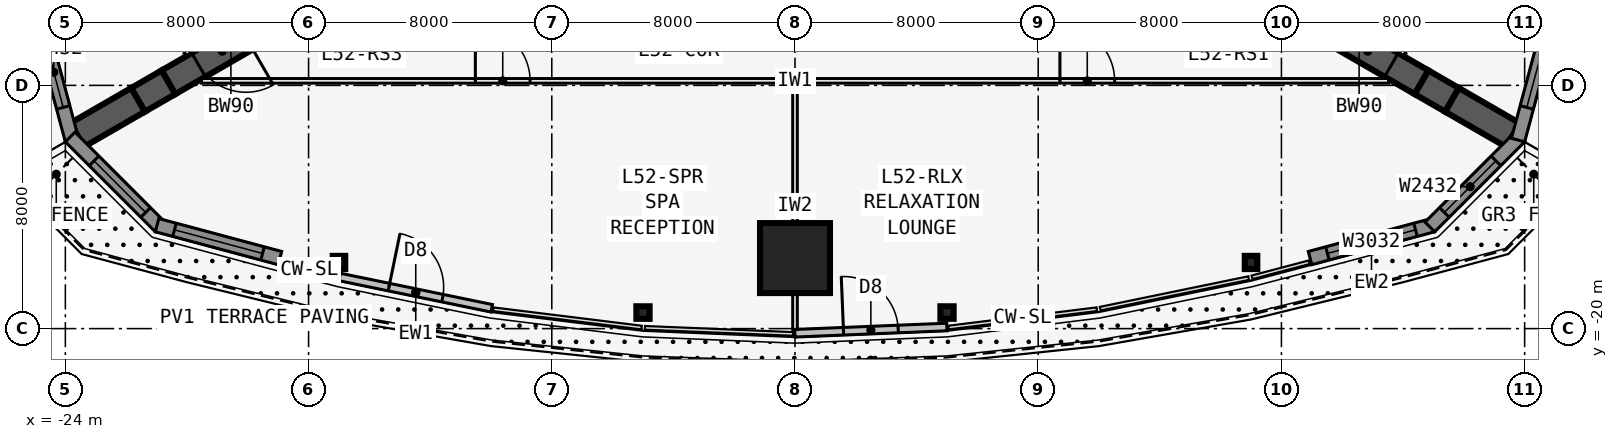
"""IFC4 building model, lengths in metres.
Left out: names, types, materials, properties, quantities, classifications, styles, units other than length and angle.
Written with IfcOpenShell. Run it as: python <this file> out.ifc"""

import sys

from ifc_helpers import new_model, si_unit, direction, frame, frame_2d, origin, origin_2d, place, context, subcontext, project, spatial, polyline, rectangle, i_section, outline, extrude, element, fill, save


model = new_model("IFC4")
c1 = context("Model", 3, precision=1e-05, world=origin(), true_north=direction((0.0, 1.0)))
c2 = subcontext(c1, "Body", "Model", "MODEL_VIEW")
j1 = project(units=[si_unit("LENGTHUNIT", "METRE"), si_unit("PLANEANGLEUNIT", "RADIAN")], contexts=[c1])
p1 = place(None, origin())
s1 = spatial("IfcSite", under=j1, at=p1, CompositionType="ELEMENT")
p2 = place(p1, origin())
s2 = spatial("IfcBuilding", under=s1, at=p2, CompositionType="ELEMENT")
p3 = place(p2, frame((0.0, 0.0, 195.9)))
s3 = spatial("IfcBuildingStorey", under=s2, at=p3, CompositionType="ELEMENT", Elevation=195.9)
p4 = place(p3, frame((16.5, -9.526, 0.0), z_axis=(0.0, 0.0, 1.0), x_axis=(0.866031398331, -0.499989616998, 0.0)))
e1 = element("IfcWall", 1, at=p4, inside=s3, PredefinedType="SHEAR", context=c2, shape_type="SweptSolid", body=[
    extrude(rectangle(XDim=4.746, YDim=0.9, at=frame_2d((2.373, 0.0))), origin(), (0.0, 0.0, 1.0), 5.0),
])
p5 = place(p4, frame((1.8, 0.0, 0.0)))
e2 = element("IfcOpeningElement", 2, at=p5, cuts=e1, PredefinedType="OPENING", context=c2, shape_type="SweptSolid", body=[
    extrude(rectangle(XDim=1.8, YDim=2.13, at=frame_2d((0.9, 1.065))), frame((0.0, 0.46, 0.0), z_axis=(0.0, -1.0, 0.0), x_axis=(1.0, 0.0, 0.0)), (0.0, 0.0, 1.0), 0.92),
])
p6 = place(p3, frame((20.61, -11.899, 0.0), z_axis=(0.0, 0.0, 1.0), x_axis=(0.866009537788, -0.500027479704, 0.0)))
e3 = element("IfcWall", 3, at=p6, inside=s3, PredefinedType="SHEAR", context=c2, shape_type="SweptSolid", body=[
    extrude(rectangle(XDim=1.155, YDim=0.9, at=frame_2d((0.577, 0.0))), origin(), (0.0, 0.0, 1.0), 5.0),
])
p7 = place(p3, frame((21.61, -12.477, 0.0), z_axis=(0.0, 0.0, 1.0), x_axis=(0.866055313784, -0.499948190782, 0.0)))
e4 = element("IfcWall", 4, at=p7, inside=s3, PredefinedType="SHEAR", context=c2, shape_type="SweptSolid", body=[
    extrude(rectangle(XDim=2.309, YDim=0.9, at=frame_2d((1.155, 0.0))), origin(), (0.0, 0.0, 1.0), 5.0),
])
p8 = place(p3, frame((-16.5, -9.526, 0.0), z_axis=(0.0, 0.0, 1.0), x_axis=(-0.866031398331, -0.499989616998, 0.0)))
e5 = element("IfcWall", 5, at=p8, inside=s3, PredefinedType="SHEAR", context=c2, shape_type="SweptSolid", body=[
    extrude(rectangle(XDim=4.746, YDim=0.9, at=frame_2d((2.373, 0.0))), origin(), (0.0, 0.0, 1.0), 5.0),
])
p9 = place(p8, frame((1.8, 0.0, 0.0)))
e6 = element("IfcOpeningElement", 6, at=p9, cuts=e5, PredefinedType="OPENING", context=c2, shape_type="SweptSolid", body=[
    extrude(rectangle(XDim=1.8, YDim=2.13, at=frame_2d((0.9, 1.065))), frame((0.0, 0.46, 0.0), z_axis=(0.0, -1.0, 0.0), x_axis=(1.0, 0.0, 0.0)), (0.0, 0.0, 1.0), 0.92),
])
p10 = place(p3, frame((-20.61, -11.899, 0.0), z_axis=(0.0, 0.0, 1.0), x_axis=(-0.866009537788, -0.500027479704, 0.0)))
e7 = element("IfcWall", 7, at=p10, inside=s3, PredefinedType="SHEAR", context=c2, shape_type="SweptSolid", body=[
    extrude(rectangle(XDim=1.155, YDim=0.9, at=frame_2d((0.577, 0.0))), origin(), (0.0, 0.0, 1.0), 5.0),
])
p11 = place(p3, frame((-21.61, -12.477, 0.0), z_axis=(0.0, 0.0, 1.0), x_axis=(-0.866055313784, -0.499948190782, 0.0)))
e8 = element("IfcWall", 8, at=p11, inside=s3, PredefinedType="SHEAR", context=c2, shape_type="SweptSolid", body=[
    extrude(rectangle(XDim=2.309, YDim=0.9, at=frame_2d((1.155, 0.0))), origin(), (0.0, 0.0, 1.0), 5.0),
])
for number, where, z_axis, x_axis in (
    (9, (-15.0, -17.825, 0.0), (0.0, 0.0, 1.0), (1.0, 0.0, 0.0)),
    (10, (-5.0, -19.472, 0.0), (0.0, 0.0, 1.0), (0.0, -1.0, 0.0)),
    (11, (5.0, -19.472, 0.0), (0.0, 0.0, 1.0), (0.0, -1.0, 0.0)),
    (12, (15.0, -17.825, 0.0), (0.0, 0.0, 1.0), (1.0, 0.0, 0.0)),
):
    element("IfcColumn", number, at=place(p3, frame(where, z_axis=z_axis, x_axis=x_axis)), inside=s3, PredefinedType="COLUMN", context=c2, shape_type="SweptSolid", body=[
        extrude(i_section(OverallWidth=0.411, OverallDepth=0.434, WebThickness=0.036, FlangeThickness=0.057, at=origin_2d()), origin(), (0.0, 0.0, 1.0), 5.0),
    ])
p12 = place(p3, frame((0.0, -17.68, 0.0), z_axis=(0.0, 0.0, 1.0), x_axis=(0.0, -1.0, 0.0)))
e13 = element("IfcColumn", 13, at=p12, inside=s3, PredefinedType="COLUMN", context=c2, shape_type="SweptSolid", body=[
    extrude(rectangle(XDim=2.3, YDim=2.3, at=origin_2d()), origin(), (0.0, 0.0, 1.0), 5.0),
])
p13 = place(p3, frame((-14.975, -18.302, 0.0), z_axis=(0.0, 0.0, 1.0), x_axis=(0.979461488189, -0.201631329795, 0.0)))
e14 = element("IfcWall", 14, at=p13, inside=s3, PredefinedType="STANDARD", context=c2, shape_type="SweptSolid", body=[
    extrude(rectangle(XDim=5.105, YDim=0.25, at=frame_2d((2.552, 0.0))), origin(), (0.0, 0.0, 1.0), 4.835),
])
p14 = place(p13, frame((1.652, 0.0, 0.0)))
e15 = element("IfcOpeningElement", 15, at=p14, cuts=e14, PredefinedType="OPENING", context=c2, shape_type="SweptSolid", body=[
    extrude(rectangle(XDim=1.8, YDim=2.4, at=frame_2d((0.9, 1.2))), frame((0.0, 0.135, 0.0), z_axis=(0.0, -1.0, 0.0), x_axis=(1.0, 0.0, 0.0)), (0.0, 0.0, 1.0), 0.27),
])
p15 = place(p3, frame((-0.005, -20.153, 0.0), z_axis=(0.0, 0.0, 1.0), x_axis=(0.999151909423, 0.041175986892, 0.0)))
e16 = element("IfcWall", 16, at=p15, inside=s3, PredefinedType="STANDARD", context=c2, shape_type="SweptSolid", body=[
    extrude(rectangle(XDim=5.004, YDim=0.25, at=frame_2d((2.502, 0.0))), origin(), (0.0, 0.0, 1.0), 4.835),
])
p16 = place(p15, frame((1.602, 0.0, 0.0)))
e17 = element("IfcOpeningElement", 17, at=p16, cuts=e16, PredefinedType="OPENING", context=c2, shape_type="SweptSolid", body=[
    extrude(rectangle(XDim=1.8, YDim=2.4, at=frame_2d((0.9, 1.2))), frame((0.0, 0.135, 0.0), z_axis=(0.0, -1.0, 0.0), x_axis=(1.0, 0.0, 0.0)), (0.0, 0.0, 1.0), 0.27),
])
p17 = place(p3, frame((16.942, -17.681, 0.0), z_axis=(0.0, 0.0, 1.0), x_axis=(0.965920442324, 0.258839137498, 0.0)))
e18 = element("IfcWall", 18, at=p17, inside=s3, PredefinedType="SOLIDWALL", context=c2, shape_type="SweptSolid", body=[
    extrude(rectangle(XDim=4.184, YDim=0.45, at=frame_2d((2.092, 0.0))), origin(), (0.0, 0.0, 1.0), 4.835),
])
p18 = place(p17, frame((0.592, 0.0, 0.6)))
e19 = element("IfcOpeningElement", 19, at=p18, cuts=e18, PredefinedType="OPENING", context=c2, shape_type="SweptSolid", body=[
    extrude(rectangle(XDim=3.0, YDim=3.2, at=frame_2d((1.5, 1.6))), frame((0.0, 0.235, 0.0), z_axis=(0.0, -1.0, 0.0), x_axis=(1.0, 0.0, 0.0)), (0.0, 0.0, 1.0), 0.47),
])
p19 = place(p3, frame((20.882, -16.656, 0.0), z_axis=(0.0, 0.0, 1.0), x_axis=(0.707077605902, 0.707135955267, 0.0)))
e20 = element("IfcWall", 20, at=p19, inside=s3, PredefinedType="SOLIDWALL", context=c2, shape_type="SweptSolid", body=[
    extrude(outline(polyline([(4.184, 0.225), (4.125, 0.225), (3.633, 0.093), (3.598, 0.225), (0.0, 0.225), (0.0, -0.225), (4.184, -0.225), (4.184, 0.225)])), origin(), (0.0, 0.0, 1.0), 4.835),
])
p20 = place(p19, frame((0.674, 0.0, 0.6)))
e21 = element("IfcOpeningElement", 21, at=p20, cuts=e20, PredefinedType="OPENING", context=c2, shape_type="SweptSolid", body=[
    extrude(rectangle(XDim=2.4, YDim=3.2, at=frame_2d((1.2, 1.6))), frame((0.0, 0.235, 0.0), z_axis=(0.0, -1.0, 0.0), x_axis=(1.0, 0.0, 0.0)), (0.0, 0.0, 1.0), 0.47),
])
p21 = place(p3, frame((23.783, -13.798, 0.0), z_axis=(0.0, 0.0, 1.0), x_axis=(0.258799282522, 0.96593112144, 0.0)))
e22 = element("IfcWall", 22, at=p21, inside=s3, PredefinedType="SOLIDWALL", context=c2, shape_type="SweptSolid", body=[
    extrude(outline(polyline([(4.184, 0.225), (0.586, 0.225), (0.551, 0.093), (0.059, 0.225), (0.0, 0.225), (0.0, -0.225), (4.184, -0.225), (4.184, 0.225)])), origin(), (0.0, 0.0, 1.0), 4.835),
])
p22 = place(p21, frame((1.11, 0.0, 0.6)))
e23 = element("IfcOpeningElement", 23, at=p22, cuts=e22, PredefinedType="OPENING", context=c2, shape_type="SweptSolid", body=[
    extrude(rectangle(XDim=2.4, YDim=3.2, at=frame_2d((1.2, 1.6))), frame((0.0, 0.235, 0.0), z_axis=(0.0, -1.0, 0.0), x_axis=(1.0, 0.0, 0.0)), (0.0, 0.0, 1.0), 0.47),
])
p23 = place(p3, frame((-24.865, -9.757, 0.0), z_axis=(0.0, 0.0, 1.0), x_axis=(0.258799282522, -0.96593112144, 0.0)))
e24 = element("IfcWall", 24, at=p23, inside=s3, PredefinedType="SOLIDWALL", context=c2, shape_type="SweptSolid", body=[
    extrude(outline(polyline([(4.184, 0.225), (4.125, 0.225), (3.633, 0.093), (3.597, 0.225), (0.0, 0.225), (0.0, -0.225), (4.184, -0.225), (4.184, 0.225)])), origin(), (0.0, 0.0, 1.0), 4.835),
])
p24 = place(p23, frame((0.674, 0.0, 0.6)))
e25 = element("IfcOpeningElement", 25, at=p24, cuts=e24, PredefinedType="OPENING", context=c2, shape_type="SweptSolid", body=[
    extrude(rectangle(XDim=2.4, YDim=3.2, at=frame_2d((1.2, 1.6))), frame((0.0, 0.235, 0.0), z_axis=(0.0, -1.0, 0.0), x_axis=(1.0, 0.0, 0.0)), (0.0, 0.0, 1.0), 0.47),
])
p25 = place(p3, frame((-23.841, -13.697, 0.0), z_axis=(0.0, 0.0, 1.0), x_axis=(0.707077605902, -0.707135955267, 0.0)))
e26 = element("IfcWall", 26, at=p25, inside=s3, PredefinedType="SOLIDWALL", context=c2, shape_type="SweptSolid", body=[
    extrude(outline(polyline([(4.184, 0.225), (0.586, 0.225), (0.551, 0.093), (0.059, 0.225), (0.0, 0.225), (0.0, -0.225), (4.184, -0.225), (4.184, 0.225)])), origin(), (0.0, 0.0, 1.0), 4.835),
])
p26 = place(p25, frame((1.11, 0.0, 0.6)))
e27 = element("IfcOpeningElement", 27, at=p26, cuts=e26, PredefinedType="OPENING", context=c2, shape_type="SweptSolid", body=[
    extrude(rectangle(XDim=2.4, YDim=3.2, at=frame_2d((1.2, 1.6))), frame((0.0, 0.235, 0.0), z_axis=(0.0, -1.0, 0.0), x_axis=(1.0, 0.0, 0.0)), (0.0, 0.0, 1.0), 0.47),
])
p27 = place(p3, frame((-20.983, -16.598, 0.0), z_axis=(0.0, 0.0, 1.0), x_axis=(0.965920442324, -0.258839137498, 0.0)))
e28 = element("IfcWall", 28, at=p27, inside=s3, PredefinedType="SOLIDWALL", context=c2, shape_type="SweptSolid", body=[
    extrude(rectangle(XDim=4.184, YDim=0.45, at=frame_2d((2.092, 0.0))), origin(), (0.0, 0.0, 1.0), 4.835),
])
p28 = place(p27, frame((0.592, 0.0, 0.6)))
e29 = element("IfcOpeningElement", 29, at=p28, cuts=e28, PredefinedType="OPENING", context=c2, shape_type="SweptSolid", body=[
    extrude(rectangle(XDim=3.0, YDim=3.2, at=frame_2d((1.5, 1.6))), frame((0.0, 0.235, 0.0), z_axis=(0.0, -1.0, 0.0), x_axis=(1.0, 0.0, 0.0)), (0.0, 0.0, 1.0), 0.47),
])
p29 = place(p3, frame((-19.527, -11.851, 0.0), z_axis=(0.0, 0.0, 1.0), x_axis=(1.0, 0.0, 0.0)))
e30 = element("IfcWall", 30, at=p29, inside=s3, PredefinedType="PARTITIONING", context=c2, shape_type="SweptSolid", body=[
    extrude(rectangle(XDim=39.054, YDim=0.15, at=frame_2d((19.527, 0.0))), origin(), (0.0, 0.0, 1.0), 4.835),
])
p30 = place(p29, frame((9.013, 0.0, 0.0)))
e31 = element("IfcOpeningElement", 31, at=p30, cuts=e30, PredefinedType="OPENING", context=c2, shape_type="SweptSolid", body=[
    extrude(rectangle(XDim=1.8, YDim=2.13, at=frame_2d((0.9, 1.065))), frame((0.0, 0.085, 0.0), z_axis=(0.0, -1.0, 0.0), x_axis=(1.0, 0.0, 0.0)), (0.0, 0.0, 1.0), 0.17),
])
p31 = place(p29, frame((28.24, 0.0, 0.0)))
e32 = element("IfcOpeningElement", 32, at=p31, cuts=e30, PredefinedType="OPENING", context=c2, shape_type="SweptSolid", body=[
    extrude(rectangle(XDim=1.8, YDim=2.13, at=frame_2d((0.9, 1.065))), frame((0.0, 0.085, 0.0), z_axis=(0.0, -1.0, 0.0), x_axis=(1.0, 0.0, 0.0)), (0.0, 0.0, 1.0), 0.17),
])
p32 = place(p3, frame((0.0, -11.926, 0.0), z_axis=(0.0, 0.0, 1.0), x_axis=(0.0, -1.0, 0.0)))
e33 = element("IfcWall", 33, at=p32, inside=s3, PredefinedType="PARTITIONING", context=c2, shape_type="SweptSolid", body=[
    extrude(rectangle(XDim=8.101, YDim=0.15, at=frame_2d((4.051, 0.0))), origin(), (0.0, 0.0, 1.0), 3.989),
])
p33 = place(p3, frame((20.027, -10.985, 0.0), z_axis=(0.0, 0.0, 1.0), x_axis=(-0.500001677587, 0.866024435227, 0.0)))
e34 = element("IfcWall", 34, at=p33, inside=s3, PredefinedType="PARTITIONING", context=c2, shape_type="SweptSolid", body=[
    extrude(rectangle(XDim=39.054, YDim=0.15, at=frame_2d((19.527, 0.0))), origin(), (0.0, 0.0, 1.0), 4.835),
])
p34 = place(p33, frame((4.414, 0.0, 0.0)))
e35 = element("IfcOpeningElement", 35, at=p34, cuts=e34, PredefinedType="OPENING", context=c2, shape_type="SweptSolid", body=[
    extrude(rectangle(XDim=1.0, YDim=2.13, at=frame_2d((0.5, 1.065))), frame((0.0, 0.085, 0.0), z_axis=(0.0, -1.0, 0.0), x_axis=(1.0, 0.0, 0.0)), (0.0, 0.0, 1.0), 0.17),
])
p35 = place(p33, frame((14.027, 0.0, 0.0)))
e36 = element("IfcOpeningElement", 36, at=p35, cuts=e34, PredefinedType="OPENING", context=c2, shape_type="SweptSolid", body=[
    extrude(rectangle(XDim=1.0, YDim=2.13, at=frame_2d((0.5, 1.065))), frame((0.0, 0.085, 0.0), z_axis=(0.0, -1.0, 0.0), x_axis=(1.0, 0.0, 0.0)), (0.0, 0.0, 1.0), 0.17),
])
p36 = place(p33, frame((24.027, 0.0, 0.0)))
e37 = element("IfcOpeningElement", 37, at=p36, cuts=e34, PredefinedType="OPENING", context=c2, shape_type="SweptSolid", body=[
    extrude(rectangle(XDim=1.0, YDim=2.13, at=frame_2d((0.5, 1.065))), frame((0.0, 0.085, 0.0), z_axis=(0.0, -1.0, 0.0), x_axis=(1.0, 0.0, 0.0)), (0.0, 0.0, 1.0), 0.17),
])
p37 = place(p33, frame((33.64, 0.0, 0.0)))
e38 = element("IfcOpeningElement", 38, at=p37, cuts=e34, PredefinedType="OPENING", context=c2, shape_type="SweptSolid", body=[
    extrude(rectangle(XDim=1.0, YDim=2.13, at=frame_2d((0.5, 1.065))), frame((0.0, 0.085, 0.0), z_axis=(0.0, -1.0, 0.0), x_axis=(1.0, 0.0, 0.0)), (0.0, 0.0, 1.0), 0.17),
])
p38 = place(p3, frame((-0.5, 22.836, 0.0), z_axis=(0.0, 0.0, 1.0), x_axis=(-0.500001677587, -0.866024435227, 0.0)))
e39 = element("IfcWall", 39, at=p38, inside=s3, PredefinedType="PARTITIONING", context=c2, shape_type="SweptSolid", body=[
    extrude(rectangle(XDim=39.054, YDim=0.15, at=frame_2d((19.527, 0.0))), origin(), (0.0, 0.0, 1.0), 4.835),
])
p39 = place(p38, frame((4.414, 0.0, 0.0)))
e40 = element("IfcOpeningElement", 40, at=p39, cuts=e39, PredefinedType="OPENING", context=c2, shape_type="SweptSolid", body=[
    extrude(rectangle(XDim=1.0, YDim=2.13, at=frame_2d((0.5, 1.065))), frame((0.0, 0.085, 0.0), z_axis=(0.0, -1.0, 0.0), x_axis=(1.0, 0.0, 0.0)), (0.0, 0.0, 1.0), 0.17),
])
p40 = place(p38, frame((10.527, 0.0, 0.0)))
e41 = element("IfcOpeningElement", 41, at=p40, cuts=e39, PredefinedType="OPENING", context=c2, shape_type="SweptSolid", body=[
    extrude(rectangle(XDim=1.0, YDim=2.13, at=frame_2d((0.5, 1.065))), frame((0.0, 0.085, 0.0), z_axis=(0.0, -1.0, 0.0), x_axis=(1.0, 0.0, 0.0)), (0.0, 0.0, 1.0), 0.17),
])
p41 = place(p38, frame((15.527, 0.0, 0.0)))
e42 = element("IfcOpeningElement", 42, at=p41, cuts=e39, PredefinedType="OPENING", context=c2, shape_type="SweptSolid", body=[
    extrude(rectangle(XDim=1.0, YDim=2.13, at=frame_2d((0.5, 1.065))), frame((0.0, 0.085, 0.0), z_axis=(0.0, -1.0, 0.0), x_axis=(1.0, 0.0, 0.0)), (0.0, 0.0, 1.0), 0.17),
])
p42 = place(p38, frame((24.027, 0.0, 0.0)))
e43 = element("IfcOpeningElement", 43, at=p42, cuts=e39, PredefinedType="OPENING", context=c2, shape_type="SweptSolid", body=[
    extrude(rectangle(XDim=1.0, YDim=2.13, at=frame_2d((0.5, 1.065))), frame((0.0, 0.085, 0.0), z_axis=(0.0, -1.0, 0.0), x_axis=(1.0, 0.0, 0.0)), (0.0, 0.0, 1.0), 0.17),
])
p43 = place(p38, frame((33.64, 0.0, 0.0)))
e44 = element("IfcOpeningElement", 44, at=p43, cuts=e39, PredefinedType="OPENING", context=c2, shape_type="SweptSolid", body=[
    extrude(rectangle(XDim=1.0, YDim=2.13, at=frame_2d((0.5, 1.065))), frame((0.0, 0.085, 0.0), z_axis=(0.0, -1.0, 0.0), x_axis=(1.0, 0.0, 0.0)), (0.0, 0.0, 1.0), 0.17),
])
p44 = place(p14, origin())
e45 = element("IfcDoor", 45, at=p44, inside=s3, OperationType="DOUBLE_DOOR_SINGLE_SWING", PredefinedType="DOOR", context=c2, shape_type="SweptSolid", body=[
    extrude(rectangle(XDim=1.8, YDim=2.4, at=frame_2d((0.9, 1.2))), frame((0.0, 0.025, 0.0), z_axis=(0.0, -1.0, 0.0), x_axis=(1.0, 0.0, 0.0)), (0.0, 0.0, 1.0), 0.05),
])
fill(e15, e45)
p45 = place(p16, origin())
e46 = element("IfcDoor", 46, at=p45, inside=s3, OperationType="DOUBLE_DOOR_SINGLE_SWING", PredefinedType="DOOR", context=c2, shape_type="SweptSolid", body=[
    extrude(rectangle(XDim=1.8, YDim=2.4, at=frame_2d((0.9, 1.2))), frame((0.0, 0.025, 0.0), z_axis=(0.0, -1.0, 0.0), x_axis=(1.0, 0.0, 0.0)), (0.0, 0.0, 1.0), 0.05),
])
fill(e17, e46)
p46 = place(p18, origin())
e47 = element("IfcWindow", 47, at=p46, inside=s3, PartitioningType="SINGLE_PANEL", PredefinedType="WINDOW", context=c2, shape_type="SweptSolid", body=[
    extrude(rectangle(XDim=3.0, YDim=3.2, at=frame_2d((1.5, 1.6))), frame((0.0, 0.03, 0.0), z_axis=(0.0, -1.0, 0.0), x_axis=(1.0, 0.0, 0.0)), (0.0, 0.0, 1.0), 0.06),
])
fill(e19, e47)
p47 = place(p20, origin())
e48 = element("IfcWindow", 48, at=p47, inside=s3, PartitioningType="SINGLE_PANEL", PredefinedType="WINDOW", context=c2, shape_type="SweptSolid", body=[
    extrude(rectangle(XDim=2.4, YDim=3.2, at=frame_2d((1.2, 1.6))), frame((0.0, 0.03, 0.0), z_axis=(0.0, -1.0, 0.0), x_axis=(1.0, 0.0, 0.0)), (0.0, 0.0, 1.0), 0.06),
])
fill(e21, e48)
p48 = place(p22, origin())
e49 = element("IfcWindow", 49, at=p48, inside=s3, PartitioningType="SINGLE_PANEL", PredefinedType="WINDOW", context=c2, shape_type="SweptSolid", body=[
    extrude(rectangle(XDim=2.4, YDim=3.2, at=frame_2d((1.2, 1.6))), frame((0.0, 0.03, 0.0), z_axis=(0.0, -1.0, 0.0), x_axis=(1.0, 0.0, 0.0)), (0.0, 0.0, 1.0), 0.06),
])
fill(e23, e49)
p49 = place(p24, origin())
e50 = element("IfcWindow", 50, at=p49, inside=s3, PartitioningType="SINGLE_PANEL", PredefinedType="WINDOW", context=c2, shape_type="SweptSolid", body=[
    extrude(rectangle(XDim=2.4, YDim=3.2, at=frame_2d((1.2, 1.6))), frame((0.0, 0.03, 0.0), z_axis=(0.0, -1.0, 0.0), x_axis=(1.0, 0.0, 0.0)), (0.0, 0.0, 1.0), 0.06),
])
fill(e25, e50)
p50 = place(p26, origin())
e51 = element("IfcWindow", 51, at=p50, inside=s3, PartitioningType="SINGLE_PANEL", PredefinedType="WINDOW", context=c2, shape_type="SweptSolid", body=[
    extrude(rectangle(XDim=2.4, YDim=3.2, at=frame_2d((1.2, 1.6))), frame((0.0, 0.03, 0.0), z_axis=(0.0, -1.0, 0.0), x_axis=(1.0, 0.0, 0.0)), (0.0, 0.0, 1.0), 0.06),
])
fill(e27, e51)
p51 = place(p28, origin())
e52 = element("IfcWindow", 52, at=p51, inside=s3, PartitioningType="SINGLE_PANEL", PredefinedType="WINDOW", context=c2, shape_type="SweptSolid", body=[
    extrude(rectangle(XDim=3.0, YDim=3.2, at=frame_2d((1.5, 1.6))), frame((0.0, 0.03, 0.0), z_axis=(0.0, -1.0, 0.0), x_axis=(1.0, 0.0, 0.0)), (0.0, 0.0, 1.0), 0.06),
])
fill(e29, e52)
p52 = place(p30, origin())
e53 = element("IfcDoor", 53, at=p52, inside=s3, OperationType="DOUBLE_DOOR_SINGLE_SWING", PredefinedType="DOOR", context=c2, shape_type="SweptSolid", body=[
    extrude(rectangle(XDim=1.8, YDim=2.13, at=frame_2d((0.9, 1.065))), frame((0.0, 0.025, 0.0), z_axis=(0.0, -1.0, 0.0), x_axis=(1.0, 0.0, 0.0)), (0.0, 0.0, 1.0), 0.05),
])
fill(e31, e53)
p53 = place(p31, origin())
e54 = element("IfcDoor", 54, at=p53, inside=s3, OperationType="DOUBLE_DOOR_SINGLE_SWING", PredefinedType="DOOR", context=c2, shape_type="SweptSolid", body=[
    extrude(rectangle(XDim=1.8, YDim=2.13, at=frame_2d((0.9, 1.065))), frame((0.0, 0.025, 0.0), z_axis=(0.0, -1.0, 0.0), x_axis=(1.0, 0.0, 0.0)), (0.0, 0.0, 1.0), 0.05),
])
fill(e32, e54)
p54 = place(p5, origin())
e55 = element("IfcDoor", 55, at=p54, inside=s3, OperationType="DOUBLE_DOOR_DOUBLE_SWING", PredefinedType="DOOR", context=c2, shape_type="SweptSolid", body=[
    extrude(rectangle(XDim=1.8, YDim=2.13, at=frame_2d((0.9, 1.065))), frame((0.0, 0.025, 0.0), z_axis=(0.0, -1.0, 0.0), x_axis=(1.0, 0.0, 0.0)), (0.0, 0.0, 1.0), 0.05),
])
fill(e2, e55)
p55 = place(p9, origin())
e56 = element("IfcDoor", 56, at=p55, inside=s3, OperationType="DOUBLE_DOOR_DOUBLE_SWING", PredefinedType="DOOR", context=c2, shape_type="SweptSolid", body=[
    extrude(rectangle(XDim=1.8, YDim=2.13, at=frame_2d((0.9, 1.065))), frame((0.0, 0.025, 0.0), z_axis=(0.0, -1.0, 0.0), x_axis=(1.0, 0.0, 0.0)), (0.0, 0.0, 1.0), 0.05),
])
fill(e6, e56)
save(model, sys.argv[1])
